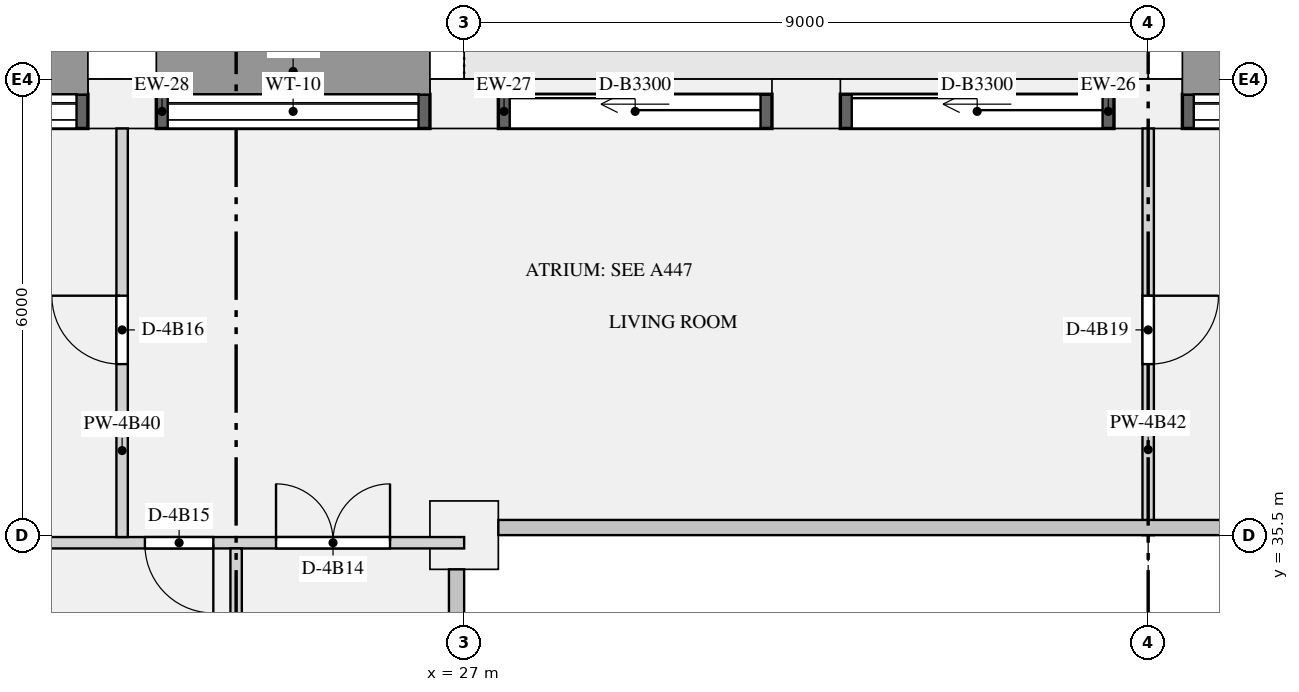
"""IFC4 building model, lengths in metres.
Left out: names, types, materials, properties, quantities, classifications, styles, units other than length and angle.
Written with IfcOpenShell. Run it as: python <this file> out.ifc"""

import sys

from ifc_helpers import new_model, si_unit, direction, frame, frame_2d, origin, origin_2d, place, context, subcontext, project, spatial, rectangle, extrude, element, fill, save


model = new_model("IFC4")
c1 = context("Model", 3, precision=1e-05, world=origin(), true_north=direction((0.0, 1.0)))
c2 = subcontext(c1, "Body", "Model", "MODEL_VIEW")
j1 = project(units=[si_unit("LENGTHUNIT", "METRE"), si_unit("PLANEANGLEUNIT", "RADIAN")], contexts=[c1])
p1 = place(None, origin())
s1 = spatial("IfcSite", under=j1, at=p1, CompositionType="ELEMENT")
p2 = place(p1, origin())
s2 = spatial("IfcBuilding", under=s1, at=p2, CompositionType="ELEMENT")
p3 = place(p2, frame((0.0, 0.0, 207.45)))
s3 = spatial("IfcBuildingStorey", under=s2, at=p3, CompositionType="ELEMENT", Elevation=207.45)
for number, where, z_axis, x_axis in (
    (1, (36.0, 41.175, 0.0), (0.0, 0.0, 1.0), (-1.0, 0.0, 0.0)),
    (2, (31.5, 41.175, 0.0), (0.0, 0.0, 1.0), (-1.0, 0.0, 0.0)),
    (3, (27.0, 41.175, 0.0), (0.0, 0.0, 1.0), (-1.0, 0.0, 0.0)),
    (4, (22.5, 41.175, 0.0), (0.0, 0.0, 1.0), (-1.0, 0.0, 0.0)),
):
    element("IfcColumn", number, at=place(p3, frame(where, z_axis=z_axis, x_axis=x_axis)), inside=s3, PredefinedType="USERDEFINED", context=c2, shape_type="SweptSolid", body=[
        extrude(rectangle(XDim=0.9, YDim=0.65, at=origin_2d()), origin(), (0.0, 0.0, 1.0), 3.15),
    ])
p4 = place(p3, frame((27.0, 35.5, 0.0), z_axis=(0.0, 0.0, 1.0), x_axis=(1.0, 0.0, 0.0)))
e5 = element("IfcColumn", 5, at=p4, inside=s3, PredefinedType="COLUMN", context=c2, shape_type="SweptSolid", body=[
    extrude(rectangle(XDim=0.9, YDim=0.9, at=origin_2d()), origin(), (0.0, 0.0, 1.0), 3.15),
])
p5 = place(p3, frame((40.05, 41.075, 0.9), z_axis=(0.0, 0.0, 1.0), x_axis=(-1.0, 0.0, 0.0)))
e6 = element("IfcWall", 6, at=p5, inside=s3, PredefinedType="SOLIDWALL", context=c2, shape_type="SweptSolid", body=[
    extrude(rectangle(XDim=3.6, YDim=0.45, at=frame_2d((1.8, 0.0))), origin(), (0.0, 0.0, 1.0), 1.93),
])
p6 = place(p5, frame((0.15, 0.0, 0.15)))
e7 = element("IfcOpeningElement", 7, at=p6, cuts=e6, PredefinedType="OPENING", context=c2, shape_type="SweptSolid", body=[
    extrude(rectangle(XDim=3.3, YDim=1.5, at=frame_2d((1.65, 0.75))), frame((0.0, 0.235, 0.0), z_axis=(0.0, -1.0, 0.0), x_axis=(1.0, 0.0, 0.0)), (0.0, 0.0, 1.0), 0.47),
])
p7 = place(p3, frame((35.55, 41.075, 0.0), z_axis=(0.0, 0.0, 1.0), x_axis=(-1.0, 0.0, 0.0)))
e8 = element("IfcWall", 8, at=p7, inside=s3, PredefinedType="SOLIDWALL", context=c2, shape_type="SweptSolid", body=[
    extrude(rectangle(XDim=3.6, YDim=0.45, at=frame_2d((1.8, 0.0))), origin(), (0.0, 0.0, 1.0), 2.83),
])
p8 = place(p7, frame((0.15, 0.0, 0.0)))
e9 = element("IfcOpeningElement", 9, at=p8, cuts=e8, PredefinedType="OPENING", context=c2, shape_type="SweptSolid", body=[
    extrude(rectangle(XDim=3.3, YDim=2.3, at=frame_2d((1.65, 1.15))), frame((0.0, 0.235, 0.0), z_axis=(0.0, -1.0, 0.0), x_axis=(1.0, 0.0, 0.0)), (0.0, 0.0, 1.0), 0.47),
])
p9 = place(p3, frame((31.05, 41.075, 0.0), z_axis=(0.0, 0.0, 1.0), x_axis=(-1.0, 0.0, 0.0)))
e10 = element("IfcWall", 10, at=p9, inside=s3, PredefinedType="SOLIDWALL", context=c2, shape_type="SweptSolid", body=[
    extrude(rectangle(XDim=3.6, YDim=0.45, at=frame_2d((1.8, 0.0))), origin(), (0.0, 0.0, 1.0), 2.83),
])
p10 = place(p9, frame((0.15, 0.0, 0.0)))
e11 = element("IfcOpeningElement", 11, at=p10, cuts=e10, PredefinedType="OPENING", context=c2, shape_type="SweptSolid", body=[
    extrude(rectangle(XDim=3.3, YDim=2.3, at=frame_2d((1.65, 1.15))), frame((0.0, 0.235, 0.0), z_axis=(0.0, -1.0, 0.0), x_axis=(1.0, 0.0, 0.0)), (0.0, 0.0, 1.0), 0.47),
])
p11 = place(p3, frame((26.55, 41.075, 0.9), z_axis=(0.0, 0.0, 1.0), x_axis=(-1.0, 0.0, 0.0)))
e12 = element("IfcWall", 12, at=p11, inside=s3, PredefinedType="SOLIDWALL", context=c2, shape_type="SweptSolid", body=[
    extrude(rectangle(XDim=3.6, YDim=0.45, at=frame_2d((1.8, 0.0))), origin(), (0.0, 0.0, 1.0), 1.93),
])
p12 = place(p11, frame((0.15, 0.0, 0.15)))
e13 = element("IfcOpeningElement", 13, at=p12, cuts=e12, PredefinedType="OPENING", context=c2, shape_type="SweptSolid", body=[
    extrude(rectangle(XDim=3.3, YDim=1.5, at=frame_2d((1.65, 0.75))), frame((0.0, 0.235, 0.0), z_axis=(0.0, -1.0, 0.0), x_axis=(1.0, 0.0, 0.0)), (0.0, 0.0, 1.0), 0.47),
])
p13 = place(p3, frame((22.05, 41.075, 0.9), z_axis=(0.0, 0.0, 1.0), x_axis=(-1.0, 0.0, 0.0)))
e14 = element("IfcWall", 14, at=p13, inside=s3, PredefinedType="SOLIDWALL", context=c2, shape_type="SweptSolid", body=[
    extrude(rectangle(XDim=3.6, YDim=0.45, at=frame_2d((1.8, 0.0))), origin(), (0.0, 0.0, 1.0), 1.93),
])
p14 = place(p13, frame((0.15, 0.0, 0.15)))
e15 = element("IfcOpeningElement", 15, at=p14, cuts=e14, PredefinedType="OPENING", context=c2, shape_type="SweptSolid", body=[
    extrude(rectangle(XDim=3.3, YDim=1.5, at=frame_2d((1.65, 0.75))), frame((0.0, 0.235, 0.0), z_axis=(0.0, -1.0, 0.0), x_axis=(1.0, 0.0, 0.0)), (0.0, 0.0, 1.0), 0.47),
])
p15 = place(p3, frame((15.8, 35.4, 0.0), z_axis=(0.0, 0.0, 1.0), x_axis=(1.0, 0.0, 0.0)))
e16 = element("IfcWall", 16, at=p15, inside=s3, PredefinedType="PARTITIONING", context=c2, shape_type="SweptSolid", body=[
    extrude(rectangle(XDim=11.2, YDim=0.15, at=frame_2d((5.6, 0.0))), origin(), (0.0, 0.0, 1.0), 2.83),
])
p16 = place(p15, frame((8.725, 0.0, 0.0)))
e17 = element("IfcOpeningElement", 17, at=p16, cuts=e16, PredefinedType="OPENING", context=c2, shape_type="SweptSolid", body=[
    extrude(rectangle(XDim=1.5, YDim=2.1, at=frame_2d((0.75, 1.05))), frame((0.0, 0.085, 0.0), z_axis=(0.0, -1.0, 0.0), x_axis=(1.0, 0.0, 0.0)), (0.0, 0.0, 1.0), 0.17),
])
p17 = place(p15, frame((7.0, 0.0, 0.0)))
e18 = element("IfcOpeningElement", 18, at=p17, cuts=e16, PredefinedType="OPENING", context=c2, shape_type="SweptSolid", body=[
    extrude(rectangle(XDim=0.9, YDim=2.1, at=frame_2d((0.45, 1.05))), frame((0.0, 0.085, 0.0), z_axis=(0.0, -1.0, 0.0), x_axis=(1.0, 0.0, 0.0)), (0.0, 0.0, 1.0), 0.17),
])
p18 = place(p15, frame((3.225, 0.0, 0.0)))
e19 = element("IfcOpeningElement", 19, at=p18, cuts=e16, PredefinedType="OPENING", context=c2, shape_type="SweptSolid", body=[
    extrude(rectangle(XDim=0.9, YDim=2.1, at=frame_2d((0.45, 1.05))), frame((0.0, 0.085, 0.0), z_axis=(0.0, -1.0, 0.0), x_axis=(1.0, 0.0, 0.0)), (0.0, 0.0, 1.0), 0.17),
])
p19 = place(p3, frame((24.0, 27.1, 0.0), z_axis=(0.0, 0.0, 1.0), x_axis=(0.0, 1.0, 0.0)))
e20 = element("IfcWall", 20, at=p19, inside=s3, PredefinedType="PARTITIONING", context=c2, shape_type="SweptSolid", body=[
    extrude(rectangle(XDim=8.225, YDim=0.15, at=frame_2d((4.112, 0.0))), origin(), (0.0, 0.0, 1.0), 2.83),
])
p20 = place(p19, frame((1.45, 0.0, 0.0)))
e21 = element("IfcOpeningElement", 21, at=p20, cuts=e20, PredefinedType="OPENING", context=c2, shape_type="SweptSolid", body=[
    extrude(rectangle(XDim=0.9, YDim=2.1, at=frame_2d((0.45, 1.05))), frame((0.0, 0.085, 0.0), z_axis=(0.0, -1.0, 0.0), x_axis=(1.0, 0.0, 0.0)), (0.0, 0.0, 1.0), 0.17),
])
p21 = place(p3, frame((22.5, 35.475, 0.0), z_axis=(0.0, 0.0, 1.0), x_axis=(0.0, 1.0, 0.0)))
e22 = element("IfcWall", 22, at=p21, inside=s3, PredefinedType="PARTITIONING", context=c2, shape_type="SweptSolid", body=[
    extrude(rectangle(XDim=5.375, YDim=0.15, at=frame_2d((2.688, 0.0))), origin(), (0.0, 0.0, 1.0), 2.83),
])
p22 = place(p21, frame((2.275, 0.0, 0.0)))
e23 = element("IfcOpeningElement", 23, at=p22, cuts=e22, PredefinedType="OPENING", context=c2, shape_type="SweptSolid", body=[
    extrude(rectangle(XDim=0.9, YDim=2.1, at=frame_2d((0.45, 1.05))), frame((0.0, 0.085, 0.0), z_axis=(0.0, -1.0, 0.0), x_axis=(1.0, 0.0, 0.0)), (0.0, 0.0, 1.0), 0.17),
])
p23 = place(p3, frame((36.0, 35.5, 0.0), z_axis=(0.0, 0.0, 1.0), x_axis=(0.0, 1.0, 0.0)))
e24 = element("IfcWall", 24, at=p23, inside=s3, PredefinedType="PARTITIONING", context=c2, shape_type="SweptSolid", body=[
    extrude(rectangle(XDim=5.35, YDim=0.15, at=frame_2d((2.675, 0.0))), origin(), (0.0, 0.0, 1.0), 2.83),
])
p24 = place(p23, frame((2.25, 0.0, 0.0)))
e25 = element("IfcOpeningElement", 25, at=p24, cuts=e24, PredefinedType="OPENING", context=c2, shape_type="SweptSolid", body=[
    extrude(rectangle(XDim=0.9, YDim=2.1, at=frame_2d((0.45, 1.05))), frame((0.0, 0.085, 0.0), z_axis=(0.0, -1.0, 0.0), x_axis=(1.0, 0.0, 0.0)), (0.0, 0.0, 1.0), 0.17),
])
p25 = place(p6, origin())
e26 = element("IfcWindow", 26, at=p25, inside=s3, PartitioningType="SINGLE_PANEL", PredefinedType="WINDOW", context=c2, shape_type="SweptSolid", body=[
    extrude(rectangle(XDim=3.3, YDim=1.5, at=frame_2d((1.65, 0.75))), frame((0.0, -0.065, 0.0), z_axis=(0.0, -1.0, 0.0), x_axis=(1.0, 0.0, 0.0)), (0.0, 0.0, 1.0), 0.06),
])
fill(e7, e26)
p26 = place(p8, origin())
e27 = element("IfcDoor", 27, at=p26, inside=s3, OperationType="SLIDING_TO_LEFT", PredefinedType="DOOR", context=c2, shape_type="SweptSolid", body=[
    extrude(rectangle(XDim=3.3, YDim=2.3, at=frame_2d((1.65, 1.15))), frame((0.0, -0.07, 0.0), z_axis=(0.0, -1.0, 0.0), x_axis=(1.0, 0.0, 0.0)), (0.0, 0.0, 1.0), 0.05),
])
fill(e9, e27)
p27 = place(p10, origin())
e28 = element("IfcDoor", 28, at=p27, inside=s3, OperationType="SLIDING_TO_LEFT", PredefinedType="DOOR", context=c2, shape_type="SweptSolid", body=[
    extrude(rectangle(XDim=3.3, YDim=2.3, at=frame_2d((1.65, 1.15))), frame((0.0, -0.07, 0.0), z_axis=(0.0, -1.0, 0.0), x_axis=(1.0, 0.0, 0.0)), (0.0, 0.0, 1.0), 0.05),
])
fill(e11, e28)
p28 = place(p12, origin())
e29 = element("IfcWindow", 29, at=p28, inside=s3, PartitioningType="SINGLE_PANEL", PredefinedType="WINDOW", context=c2, shape_type="SweptSolid", body=[
    extrude(rectangle(XDim=3.3, YDim=1.5, at=frame_2d((1.65, 0.75))), frame((0.0, -0.065, 0.0), z_axis=(0.0, -1.0, 0.0), x_axis=(1.0, 0.0, 0.0)), (0.0, 0.0, 1.0), 0.06),
])
fill(e13, e29)
p29 = place(p14, origin())
e30 = element("IfcWindow", 30, at=p29, inside=s3, PartitioningType="SINGLE_PANEL", PredefinedType="WINDOW", context=c2, shape_type="SweptSolid", body=[
    extrude(rectangle(XDim=3.3, YDim=1.5, at=frame_2d((1.65, 0.75))), frame((0.0, -0.065, 0.0), z_axis=(0.0, -1.0, 0.0), x_axis=(1.0, 0.0, 0.0)), (0.0, 0.0, 1.0), 0.06),
])
fill(e15, e30)
p30 = place(p16, origin())
e31 = element("IfcDoor", 31, at=p30, inside=s3, OperationType="DOUBLE_DOOR_SINGLE_SWING", PredefinedType="DOOR", context=c2, shape_type="SweptSolid", body=[
    extrude(rectangle(XDim=1.5, YDim=2.1, at=frame_2d((0.75, 1.05))), frame((0.0, 0.025, 0.0), z_axis=(0.0, -1.0, 0.0), x_axis=(1.0, 0.0, 0.0)), (0.0, 0.0, 1.0), 0.05),
])
fill(e17, e31)
p31 = place(p17, frame((0.9, 0.0, 0.0), z_axis=(0.0, 0.0, 1.0), x_axis=(-1.0, 0.0, 0.0)))
e32 = element("IfcDoor", 32, at=p31, inside=s3, OperationType="SINGLE_SWING_LEFT", PredefinedType="DOOR", context=c2, shape_type="SweptSolid", body=[
    extrude(rectangle(XDim=0.9, YDim=2.1, at=frame_2d((0.45, 1.05))), frame((0.0, 0.025, 0.0), z_axis=(0.0, -1.0, 0.0), x_axis=(1.0, 0.0, 0.0)), (0.0, 0.0, 1.0), 0.05),
])
fill(e18, e32)
p32 = place(p22, origin())
e33 = element("IfcDoor", 33, at=p32, inside=s3, OperationType="SINGLE_SWING_RIGHT", PredefinedType="DOOR", context=c2, shape_type="SweptSolid", body=[
    extrude(rectangle(XDim=0.9, YDim=2.1, at=frame_2d((0.45, 1.05))), frame((0.0, 0.025, 0.0), z_axis=(0.0, -1.0, 0.0), x_axis=(1.0, 0.0, 0.0)), (0.0, 0.0, 1.0), 0.05),
])
fill(e23, e33)
p33 = place(p24, frame((0.9, 0.0, 0.0), z_axis=(0.0, 0.0, 1.0), x_axis=(-1.0, 0.0, 0.0)))
e34 = element("IfcDoor", 34, at=p33, inside=s3, OperationType="SINGLE_SWING_LEFT", PredefinedType="DOOR", context=c2, shape_type="SweptSolid", body=[
    extrude(rectangle(XDim=0.9, YDim=2.1, at=frame_2d((0.45, 1.05))), frame((0.0, 0.025, 0.0), z_axis=(0.0, -1.0, 0.0), x_axis=(1.0, 0.0, 0.0)), (0.0, 0.0, 1.0), 0.05),
])
fill(e25, e34)
save(model, sys.argv[1])
